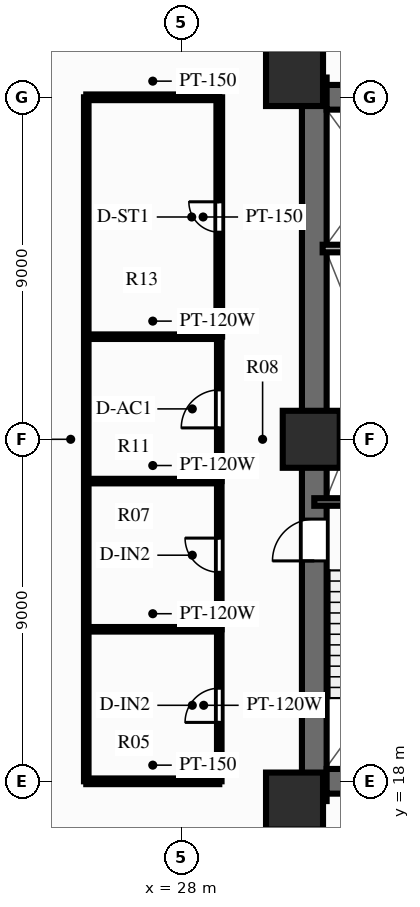
"""IFC4 building model, lengths in metres.
Left out: names, types, materials, properties, quantities, classifications, styles, units other than length and angle.
Written with IfcOpenShell. Run it as: python <this file> out.ifc"""

import sys

from ifc_helpers import new_model, si_unit, direction, frame, frame_2d, origin, origin_2d, place, context, subcontext, project, spatial, rectangle, extrude, source, transform, mapped, element, fill, save


model = new_model("IFC4")
c1 = context("Model", 3, precision=1e-05, world=origin(), true_north=direction((0.0, 1.0)))
c2 = subcontext(c1, "Body", "Model", "MODEL_VIEW")
j1 = project(units=[si_unit("LENGTHUNIT", "METRE"), si_unit("PLANEANGLEUNIT", "RADIAN")], contexts=[c1])
p1 = place(None, origin())
s1 = spatial("IfcSite", under=j1, at=p1, CompositionType="ELEMENT")
p2 = place(p1, origin())
s2 = spatial("IfcBuilding", under=s1, at=p2, CompositionType="ELEMENT")
p3 = place(p2, frame((0.0, 0.0, 15.0)))
s3 = spatial("IfcBuildingStorey", under=s2, at=p3, CompositionType="ELEMENT", Elevation=15.0)
p4 = place(p3, frame((31.5, 17.48, 0.0), z_axis=(0.0, 0.0, 1.0), x_axis=(0.0, 1.0, 0.0)))
e1 = element("IfcWall", 1, at=p4, inside=s3, PredefinedType="SHEAR", context=c2, shape_type="SweptSolid", body=[
    extrude(rectangle(XDim=19.04, YDim=0.65, at=frame_2d((9.52, 0.0))), origin(), (0.0, 0.0, 1.0), 4.4),
])
p5 = place(p4, frame((6.32, 0.0, 0.0)))
e2 = element("IfcOpeningElement", 2, at=p5, cuts=e1, PredefinedType="OPENING", context=c2, shape_type="SweptSolid", body=[
    extrude(rectangle(XDim=1.1, YDim=2.15, at=frame_2d((0.55, 1.075))), frame((0.0, 0.337, 0.0), z_axis=(0.0, -1.0, 0.0), x_axis=(1.0, 0.0, 0.0)), (0.0, 0.0, 1.0), 0.674),
])
p6 = place(p3, frame((31.825, 18.0, 0.0), z_axis=(0.0, 0.0, 1.0), x_axis=(1.0, 0.0, 0.0)))
e3 = element("IfcWall", 3, at=p6, inside=s3, PredefinedType="SHEAR", context=c2, shape_type="SweptSolid", body=[
    extrude(rectangle(XDim=12.35, YDim=0.65, at=frame_2d((6.175, 0.0))), origin(), (0.0, 0.0, 1.0), 4.4),
])
p7 = place(p3, frame((31.825, 36.0, 0.0), z_axis=(0.0, 0.0, 1.0), x_axis=(1.0, 0.0, 0.0)))
e4 = element("IfcWall", 4, at=p7, inside=s3, PredefinedType="SHEAR", context=c2, shape_type="SweptSolid", body=[
    extrude(rectangle(XDim=12.35, YDim=0.65, at=frame_2d((6.175, 0.0))), origin(), (0.0, 0.0, 1.0), 4.4),
])
p8 = place(p7, frame((5.125, 0.0, 0.0), z_axis=(0.0, 0.0, 1.0), x_axis=(-1.0, 0.0, 0.0)))
e5 = element("IfcOpeningElement", 5, at=p8, cuts=e4, PredefinedType="OPENING", context=c2, shape_type="SweptSolid", body=[
    extrude(rectangle(XDim=1.4, YDim=2.15, at=frame_2d((0.7, 1.075))), frame((0.0, 0.337, 0.0), z_axis=(0.0, -1.0, 0.0), x_axis=(1.0, 0.0, 0.0)), (0.0, 0.0, 1.0), 0.674),
])
m1 = source(origin(), c2, "Body", "SweptSolid", [
    extrude(rectangle(XDim=1.5, YDim=1.5, at=origin_2d()), origin(), (0.0, 0.0, 1.0), 4.4),
])
for number, where, z_axis, x_axis in (
    (6, (30.98, 17.48, 0.0), (0.0, 0.0, 1.0), (1.0, 0.0, 0.0)),
    (7, (30.98, 36.52, 0.0), (0.0, 0.0, 1.0), (1.0, 0.0, 0.0)),
    (8, (31.42, 27.0, 0.0), (0.0, 0.0, 1.0), (1.0, 0.0, 0.0)),
):
    element("IfcColumn", number, at=place(p3, frame(where, z_axis=z_axis, x_axis=x_axis)), inside=s3, PredefinedType="COLUMN", context=c2, shape_type="MappedRepresentation", body=[
        mapped(m1, transform((0.0, 0.0, 0.0), scale=1.0)),
    ])
p9 = place(p3, frame((31.5, 25.35, 0.0), z_axis=(0.0, 0.0, 1.0), x_axis=(1.0, 0.0, 0.0)))
e9 = element("IfcWall", 9, at=p9, inside=s3, PredefinedType="SOLIDWALL", context=c2, shape_type="SweptSolid", body=[
    extrude(rectangle(XDim=3.93, YDim=0.2, at=frame_2d((1.965, 0.0))), origin(), (0.0, 0.0, 1.0), 4.19),
])
p10 = place(p3, frame((31.72, 32.02, 0.0), z_axis=(0.0, 0.0, 1.0), x_axis=(1.0, 0.0, 0.0)))
e10 = element("IfcWall", 10, at=p10, inside=s3, PredefinedType="PARTITIONING", context=c2, shape_type="SweptSolid", body=[
    extrude(rectangle(XDim=2.8, YDim=0.2, at=frame_2d((1.4, 0.0))), origin(), (0.0, 0.0, 1.0), 4.08),
])
p11 = place(p3, frame((25.5, 18.0, 0.0), z_axis=(0.0, 0.0, 1.0), x_axis=(0.0, 1.0, 0.0)))
e11 = element("IfcWall", 11, at=p11, inside=s3, PredefinedType="PARTITIONING", context=c2, shape_type="SweptSolid", body=[
    extrude(rectangle(XDim=18.0, YDim=0.12, at=frame_2d((9.0, 0.0))), origin(), (0.0, 0.0, 1.0), 4.08),
])
p12 = place(p3, frame((29.0, 18.0, 0.0), z_axis=(0.0, 0.0, 1.0), x_axis=(0.0, 1.0, 0.0)))
e12 = element("IfcWall", 12, at=p12, inside=s3, PredefinedType="PARTITIONING", context=c2, shape_type="SweptSolid", body=[
    extrude(rectangle(XDim=4.0, YDim=0.12, at=frame_2d((2.0, 0.0))), origin(), (0.0, 0.0, 1.0), 4.08),
])
p13 = place(p12, frame((1.55, 0.0, 0.0)))
e13 = element("IfcOpeningElement", 13, at=p13, cuts=e12, PredefinedType="OPENING", context=c2, shape_type="SweptSolid", body=[
    extrude(rectangle(XDim=0.9, YDim=2.1, at=frame_2d((0.45, 1.05))), frame((0.0, 0.072, 0.0), z_axis=(0.0, -1.0, 0.0), x_axis=(1.0, 0.0, 0.0)), (0.0, 0.0, 1.0), 0.144),
])
p14 = place(p3, frame((29.0, 22.0, 0.0), z_axis=(0.0, 0.0, 1.0), x_axis=(0.0, 1.0, 0.0)))
e14 = element("IfcWall", 14, at=p14, inside=s3, PredefinedType="PARTITIONING", context=c2, shape_type="SweptSolid", body=[
    extrude(rectangle(XDim=3.9, YDim=0.12, at=frame_2d((1.95, 0.0))), origin(), (0.0, 0.0, 1.0), 4.08),
])
p15 = place(p14, frame((1.5, 0.0, 0.0)))
e15 = element("IfcOpeningElement", 15, at=p15, cuts=e14, PredefinedType="OPENING", context=c2, shape_type="SweptSolid", body=[
    extrude(rectangle(XDim=0.9, YDim=2.1, at=frame_2d((0.45, 1.05))), frame((0.0, 0.072, 0.0), z_axis=(0.0, -1.0, 0.0), x_axis=(1.0, 0.0, 0.0)), (0.0, 0.0, 1.0), 0.144),
])
p16 = place(p3, frame((29.0, 25.9, 0.0), z_axis=(0.0, 0.0, 1.0), x_axis=(0.0, 1.0, 0.0)))
e16 = element("IfcWall", 16, at=p16, inside=s3, PredefinedType="PARTITIONING", context=c2, shape_type="SweptSolid", body=[
    extrude(rectangle(XDim=3.8, YDim=0.12, at=frame_2d((1.9, 0.0))), origin(), (0.0, 0.0, 1.0), 4.08),
])
p17 = place(p16, frame((1.4, 0.0, 0.0)))
e17 = element("IfcOpeningElement", 17, at=p17, cuts=e16, PredefinedType="OPENING", context=c2, shape_type="SweptSolid", body=[
    extrude(rectangle(XDim=1.0, YDim=2.1, at=frame_2d((0.5, 1.05))), frame((0.0, 0.072, 0.0), z_axis=(0.0, -1.0, 0.0), x_axis=(1.0, 0.0, 0.0)), (0.0, 0.0, 1.0), 0.144),
])
p18 = place(p3, frame((29.0, 29.7, 0.0), z_axis=(0.0, 0.0, 1.0), x_axis=(0.0, 1.0, 0.0)))
e18 = element("IfcWall", 18, at=p18, inside=s3, PredefinedType="PARTITIONING", context=c2, shape_type="SweptSolid", body=[
    extrude(rectangle(XDim=6.3, YDim=0.15, at=frame_2d((3.15, 0.0))), origin(), (0.0, 0.0, 1.0), 4.08),
])
p19 = place(p18, frame((2.75, 0.0, 0.0)))
e19 = element("IfcOpeningElement", 19, at=p19, cuts=e18, PredefinedType="OPENING", context=c2, shape_type="SweptSolid", body=[
    extrude(rectangle(XDim=0.8, YDim=2.05, at=frame_2d((0.4, 1.025))), frame((0.0, 0.087, 0.0), z_axis=(0.0, -1.0, 0.0), x_axis=(1.0, 0.0, 0.0)), (0.0, 0.0, 1.0), 0.174),
])
for number, where, z_axis, x_axis in (
    (20, (25.5, 22.0, 0.0), (0.0, 0.0, 1.0), (1.0, 0.0, 0.0)),
    (21, (25.5, 25.9, 0.0), (0.0, 0.0, 1.0), (1.0, 0.0, 0.0)),
    (22, (25.5, 29.7, 0.0), (0.0, 0.0, 1.0), (1.0, 0.0, 0.0)),
):
    element("IfcWall", number, at=place(p3, frame(where, z_axis=z_axis, x_axis=x_axis)), inside=s3, PredefinedType="PARTITIONING", context=c2, shape_type="SweptSolid", body=[
        extrude(rectangle(XDim=3.5, YDim=0.12, at=frame_2d((1.75, 0.0))), origin(), (0.0, 0.0, 1.0), 4.08),
    ])
for number, where, z_axis, x_axis in (
    (23, (25.5, 36.0, 0.0), (0.0, 0.0, 1.0), (1.0, 0.0, 0.0)),
    (24, (25.5, 18.0, 0.0), (0.0, 0.0, 1.0), (1.0, 0.0, 0.0)),
):
    element("IfcWall", number, at=place(p3, frame(where, z_axis=z_axis, x_axis=x_axis)), inside=s3, PredefinedType="PARTITIONING", context=c2, shape_type="SweptSolid", body=[
        extrude(rectangle(XDim=3.5, YDim=0.15, at=frame_2d((1.75, 0.0))), origin(), (0.0, 0.0, 1.0), 2.94),
    ])
m2 = source(origin(), c2, "Body", "SweptSolid", [
    extrude(rectangle(XDim=1.1, YDim=2.15, at=frame_2d((0.55, 1.075))), frame((0.0, 0.025, 0.0), z_axis=(0.0, -1.0, 0.0), x_axis=(1.0, 0.0, 0.0)), (0.0, 0.0, 1.0), 0.05),
])
p20 = place(p5, origin())
e25 = element("IfcDoor", 25, at=p20, inside=s3, OperationType="SINGLE_SWING_LEFT", PredefinedType="DOOR", context=c2, shape_type="MappedRepresentation", body=[
    mapped(m2, transform((0.0, 0.0, 0.0), scale=1.0)),
])
fill(e2, e25)
m3 = source(origin(), c2, "Body", "SweptSolid", [
    extrude(rectangle(XDim=0.9, YDim=2.1, at=frame_2d((0.45, 1.05))), frame((0.0, 0.025, 0.0), z_axis=(0.0, -1.0, 0.0), x_axis=(1.0, 0.0, 0.0)), (0.0, 0.0, 1.0), 0.05),
])
p21 = place(p13, origin())
e26 = element("IfcDoor", 26, at=p21, inside=s3, OperationType="SINGLE_SWING_LEFT", PredefinedType="DOOR", context=c2, shape_type="MappedRepresentation", body=[
    mapped(m3, transform((0.0, 0.0, 0.0), scale=1.0)),
])
fill(e13, e26)
p22 = place(p15, origin())
e27 = element("IfcDoor", 27, at=p22, inside=s3, OperationType="SINGLE_SWING_RIGHT", PredefinedType="DOOR", context=c2, shape_type="MappedRepresentation", body=[
    mapped(m3, transform((0.0, 0.0, 0.0), scale=1.0)),
])
fill(e15, e27)
m4 = source(origin(), c2, "Body", "SweptSolid", [
    extrude(rectangle(XDim=1.0, YDim=2.1, at=frame_2d((0.5, 1.05))), frame((0.0, 0.025, 0.0), z_axis=(0.0, -1.0, 0.0), x_axis=(1.0, 0.0, 0.0)), (0.0, 0.0, 1.0), 0.05),
])
p23 = place(p17, origin())
e28 = element("IfcDoor", 28, at=p23, inside=s3, OperationType="SINGLE_SWING_LEFT", PredefinedType="DOOR", context=c2, shape_type="MappedRepresentation", body=[
    mapped(m4, transform((0.0, 0.0, 0.0), scale=1.0)),
])
fill(e17, e28)
m5 = source(origin(), c2, "Body", "SweptSolid", [
    extrude(rectangle(XDim=0.8, YDim=2.05, at=frame_2d((0.4, 1.025))), frame((0.0, 0.025, 0.0), z_axis=(0.0, -1.0, 0.0), x_axis=(1.0, 0.0, 0.0)), (0.0, 0.0, 1.0), 0.05),
])
p24 = place(p19, origin())
e29 = element("IfcDoor", 29, at=p24, inside=s3, OperationType="SINGLE_SWING_RIGHT", PredefinedType="DOOR", context=c2, shape_type="MappedRepresentation", body=[
    mapped(m5, transform((0.0, 0.0, 0.0), scale=1.0)),
])
fill(e19, e29)
save(model, sys.argv[1])
